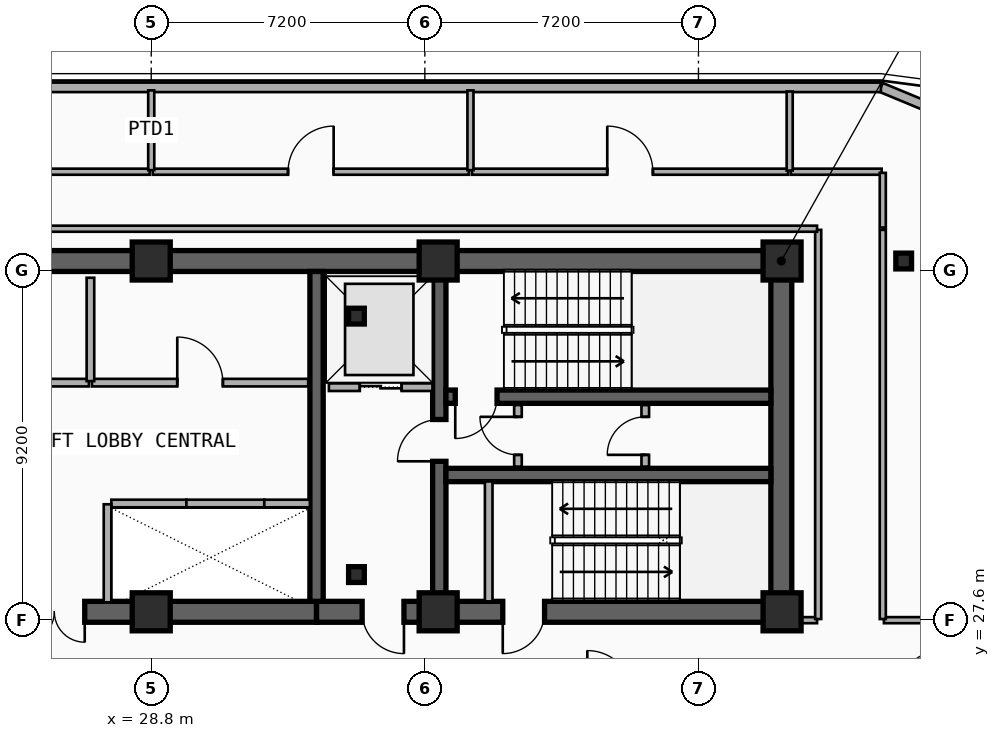
"""IFC4 building model, lengths in metres.
Left out: names, types, materials, properties, quantities, classifications, styles, units other than length and angle.
Written with IfcOpenShell. Run it as: python <this file> out.ifc"""

import sys

from ifc_helpers import new_model, si_unit, direction, frame, frame_2d, origin, origin_2d, place, context, subcontext, project, spatial, rectangle, i_section, extrude, element, fill, save


model = new_model("IFC4")
c1 = context("Model", 3, precision=1e-05, world=origin(), true_north=direction((0.0, 1.0)))
c2 = subcontext(c1, "Body", "Model", "MODEL_VIEW")
j1 = project(units=[si_unit("LENGTHUNIT", "METRE"), si_unit("PLANEANGLEUNIT", "RADIAN")], contexts=[c1])
p1 = place(None, origin())
s1 = spatial("IfcSite", under=j1, at=p1, CompositionType="ELEMENT")
p2 = place(p1, origin())
s2 = spatial("IfcBuilding", under=s1, at=p2, CompositionType="ELEMENT")
p3 = place(p2, frame((0.0, 0.0, 188.4)))
s3 = spatial("IfcBuildingStorey", under=s2, at=p3, CompositionType="ELEMENT", Elevation=188.4)
p4 = place(p3, frame((12.15, 37.05, 0.0), z_axis=(0.0, 0.0, 1.0), x_axis=(1.0, 0.0, 0.0)))
e1 = element("IfcWall", 1, at=p4, inside=s3, PredefinedType="SHEAR", context=c2, shape_type="SweptSolid", body=[
    extrude(rectangle(XDim=33.23, YDim=0.55, at=frame_2d((16.615, 0.0))), origin(), (0.0, 0.0, 1.0), 4.8),
])
p5 = place(p3, frame((33.15, 27.82, 0.0), z_axis=(0.0, 0.0, 1.0), x_axis=(-1.0, 0.0, 0.0)))
e2 = element("IfcWall", 2, at=p5, inside=s3, PredefinedType="SHEAR", context=c2, shape_type="SweptSolid", body=[
    extrude(rectangle(XDim=11.97, YDim=0.55, at=frame_2d((5.985, 0.0))), origin(), (0.0, 0.0, 1.0), 4.8),
])
p6 = place(p5, frame((6.1, 0.0, 0.0)))
e3 = element("IfcOpeningElement", 3, at=p6, cuts=e2, PredefinedType="OPENING", context=c2, shape_type="SweptSolid", body=[
    extrude(rectangle(XDim=1.6, YDim=2.2, at=frame_2d((0.8, 1.1))), frame((0.0, 0.285, 0.0), z_axis=(0.0, -1.0, 0.0), x_axis=(1.0, 0.0, 0.0)), (0.0, 0.0, 1.0), 0.57),
])
p7 = place(p3, frame((45.38, 27.82, 0.0), z_axis=(0.0, 0.0, 1.0), x_axis=(-1.0, 0.0, 0.0)))
e4 = element("IfcWall", 4, at=p7, inside=s3, PredefinedType="SHEAR", context=c2, shape_type="SweptSolid", body=[
    extrude(rectangle(XDim=12.23, YDim=0.55, at=frame_2d((6.115, 0.0))), origin(), (0.0, 0.0, 1.0), 4.8),
])
p8 = place(p7, frame((9.93, 0.0, 0.0)))
e5 = element("IfcOpeningElement", 5, at=p8, cuts=e4, PredefinedType="OPENING", context=c2, shape_type="SweptSolid", body=[
    extrude(rectangle(XDim=1.1, YDim=2.15, at=frame_2d((0.55, 1.075))), frame((0.0, 0.285, 0.0), z_axis=(0.0, -1.0, 0.0), x_axis=(1.0, 0.0, 0.0)), (0.0, 0.0, 1.0), 0.57),
])
p9 = place(p7, frame((6.23, 0.0, 0.0)))
e6 = element("IfcOpeningElement", 6, at=p9, cuts=e4, PredefinedType="OPENING", context=c2, shape_type="SweptSolid", body=[
    extrude(rectangle(XDim=1.1, YDim=2.15, at=frame_2d((0.55, 1.075))), frame((0.0, 0.285, 0.0), z_axis=(0.0, -1.0, 0.0), x_axis=(1.0, 0.0, 0.0)), (0.0, 0.0, 1.0), 0.57),
])
p10 = place(p3, frame((45.38, 28.095, 0.0), z_axis=(0.0, 0.0, 1.0), x_axis=(0.0, 1.0, 0.0)))
e7 = element("IfcWall", 7, at=p10, inside=s3, PredefinedType="SHEAR", context=c2, shape_type="SweptSolid", body=[
    extrude(rectangle(XDim=8.68, YDim=0.55, at=frame_2d((4.34, 0.0))), origin(), (0.0, 0.0, 1.0), 4.8),
])
p11 = place(p3, frame((33.15, 28.095, 0.0), z_axis=(0.0, 0.0, 1.0), x_axis=(0.0, 1.0, 0.0)))
e8 = element("IfcWall", 8, at=p11, inside=s3, PredefinedType="SHEAR", context=c2, shape_type="SweptSolid", body=[
    extrude(rectangle(XDim=8.68, YDim=0.35, at=frame_2d((4.34, 0.0))), origin(), (0.0, 0.0, 1.0), 4.8),
])
p12 = place(p3, frame((36.38, 28.095, 0.0), z_axis=(0.0, 0.0, 1.0), x_axis=(0.0, 1.0, 0.0)))
e9 = element("IfcWall", 9, at=p12, inside=s3, PredefinedType="SHEAR", context=c2, shape_type="SweptSolid", body=[
    extrude(rectangle(XDim=8.68, YDim=0.35, at=frame_2d((4.34, 0.0))), origin(), (0.0, 0.0, 1.0), 4.8),
])
p13 = place(p12, frame((3.685, 0.0, 0.0)))
e10 = element("IfcOpeningElement", 10, at=p13, cuts=e9, PredefinedType="OPENING", context=c2, shape_type="SweptSolid", body=[
    extrude(rectangle(XDim=1.1, YDim=2.15, at=frame_2d((0.55, 1.075))), frame((0.0, 0.185, 0.0), z_axis=(0.0, -1.0, 0.0), x_axis=(1.0, 0.0, 0.0)), (0.0, 0.0, 1.0), 0.37),
])
p14 = place(p3, frame((45.105, 33.48, 0.0), z_axis=(0.0, 0.0, 1.0), x_axis=(-1.0, 0.0, 0.0)))
e11 = element("IfcWall", 11, at=p14, inside=s3, PredefinedType="SHEAR", context=c2, shape_type="SweptSolid", body=[
    extrude(rectangle(XDim=8.55, YDim=0.35, at=frame_2d((4.275, 0.0))), origin(), (0.0, 0.0, 1.0), 4.8),
])
p15 = place(p14, frame((7.205, 0.0, 0.0)))
e12 = element("IfcOpeningElement", 12, at=p15, cuts=e11, PredefinedType="OPENING", context=c2, shape_type="SweptSolid", body=[
    extrude(rectangle(XDim=1.1, YDim=2.15, at=frame_2d((0.55, 1.075))), frame((0.0, 0.185, 0.0), z_axis=(0.0, -1.0, 0.0), x_axis=(1.0, 0.0, 0.0)), (0.0, 0.0, 1.0), 0.37),
])
p16 = place(p3, frame((36.555, 31.42, 0.0), z_axis=(0.0, 0.0, 1.0), x_axis=(1.0, 0.0, 0.0)))
e13 = element("IfcWall", 13, at=p16, inside=s3, PredefinedType="SHEAR", context=c2, shape_type="SweptSolid", body=[
    extrude(rectangle(XDim=8.55, YDim=0.35, at=frame_2d((4.275, 0.0))), origin(), (0.0, 0.0, 1.0), 4.8),
])
for number, where, z_axis, x_axis in (
    (14, (34.2, 28.8, 0.0), (0.0, 0.0, 1.0), (1.0, 0.0, 0.0)),
    (15, (34.2, 35.6, 0.0), (0.0, 0.0, 1.0), (1.0, 0.0, 0.0)),
):
    element("IfcColumn", number, at=place(p3, frame(where, z_axis=z_axis, x_axis=x_axis)), inside=s3, PredefinedType="COLUMN", context=c2, shape_type="SweptSolid", body=[
        extrude(i_section(OverallWidth=0.413, OverallDepth=0.415, WebThickness=0.03, FlangeThickness=0.047, FilletRadius=0.015, at=origin_2d()), origin(), (0.0, 0.0, 1.0), 4.8),
    ])
for number, where, z_axis, x_axis in (
    (16, (28.8, 27.82, 0.0), (0.0, 0.0, 1.0), (1.0, 0.0, 0.0)),
    (17, (28.8, 37.05, 0.0), (0.0, 0.0, 1.0), (1.0, 0.0, 0.0)),
    (18, (36.35, 27.82, 0.0), (0.0, 0.0, 1.0), (1.0, 0.0, 0.0)),
    (19, (36.35, 37.05, 0.0), (0.0, 0.0, 1.0), (1.0, 0.0, 0.0)),
    (20, (45.4, 27.82, 0.0), (0.0, 0.0, 1.0), (1.0, 0.0, 0.0)),
    (21, (45.4, 37.05, 0.0), (0.0, 0.0, 1.0), (1.0, 0.0, 0.0)),
):
    element("IfcColumn", number, at=place(p3, frame(where, z_axis=z_axis, x_axis=x_axis)), inside=s3, PredefinedType="COLUMN", context=c2, shape_type="SweptSolid", body=[
        extrude(rectangle(XDim=1.0, YDim=1.0, at=origin_2d()), origin(), (0.0, 0.0, 1.0), 4.8),
    ])
p17 = place(p3, frame((48.6, 37.05, 0.0), z_axis=(0.0, 0.0, 1.0), x_axis=(1.0, 0.0, 0.0)))
e22 = element("IfcColumn", 22, at=p17, inside=s3, PredefinedType="COLUMN", context=c2, shape_type="SweptSolid", body=[
    extrude(i_section(OverallWidth=0.413, OverallDepth=0.415, WebThickness=0.03, FlangeThickness=0.047, FilletRadius=0.015, at=origin_2d()), origin(), (0.0, 0.0, 1.0), 4.8),
])
p18 = place(p3, frame((48.0, 41.62, 0.0), z_axis=(0.0, 0.0, 1.0), x_axis=(0.923870793506, -0.382704529509, 0.0)))
e23 = element("IfcWall", 23, at=p18, inside=s3, PredefinedType="SOLIDWALL", context=c2, shape_type="SweptSolid", body=[
    extrude(rectangle(XDim=3.077, YDim=0.25, at=frame_2d((1.538, 0.0))), origin(), (0.0, 0.0, 1.0), 4.48),
])
p19 = place(p3, frame((9.6, 41.62, 0.0), z_axis=(0.0, 0.0, 1.0), x_axis=(1.0, 0.0, 0.0)))
e24 = element("IfcWall", 24, at=p19, inside=s3, PredefinedType="SOLIDWALL", context=c2, shape_type="SweptSolid", body=[
    extrude(rectangle(XDim=38.4, YDim=0.25, at=frame_2d((19.2, 0.0))), origin(), (0.0, 0.0, 1.0), 4.48),
])
p20 = place(p3, frame((33.475, 33.73, 0.0), z_axis=(0.0, 0.0, 1.0), x_axis=(1.0, 0.0, 0.0)))
e25 = element("IfcWall", 25, at=p20, inside=s3, PredefinedType="PARTITIONING", context=c2, shape_type="SweptSolid", body=[
    extrude(rectangle(XDim=2.725, YDim=0.2, at=frame_2d((1.362, 0.0))), origin(), (0.0, 0.0, 1.0), 3.55),
])
p21 = place(p20, frame((0.812, 0.0, 0.0)))
e26 = element("IfcOpeningElement", 26, at=p21, cuts=e25, PredefinedType="OPENING", context=c2, shape_type="SweptSolid", body=[
    extrude(rectangle(XDim=1.1, YDim=2.15, at=frame_2d((0.55, 1.075))), frame((0.0, 0.11, 0.0), z_axis=(0.0, -1.0, 0.0), x_axis=(1.0, 0.0, 0.0)), (0.0, 0.0, 1.0), 0.22),
])
p22 = place(p3, frame((27.75, 30.67, 0.0), z_axis=(0.0, 0.0, 1.0), x_axis=(1.0, 0.0, 0.0)))
e27 = element("IfcWall", 27, at=p22, inside=s3, PredefinedType="PARTITIONING", context=c2, shape_type="SweptSolid", body=[
    extrude(rectangle(XDim=1.975, YDim=0.2, at=frame_2d((0.988, 0.0))), origin(), (0.0, 0.0, 1.0), 3.55),
])
p23 = place(p3, frame((27.65, 28.07, 0.0), z_axis=(0.0, 0.0, 1.0), x_axis=(0.0, 1.0, 0.0)))
e28 = element("IfcWall", 28, at=p23, inside=s3, PredefinedType="PARTITIONING", context=c2, shape_type="SweptSolid", body=[
    extrude(rectangle(XDim=2.58, YDim=0.2, at=frame_2d((1.29, 0.0))), origin(), (0.0, 0.0, 1.0), 3.55),
])
p24 = place(p3, frame((29.725, 30.67, 0.0), z_axis=(0.0, 0.0, 1.0), x_axis=(1.0, 0.0, 0.0)))
e29 = element("IfcWall", 29, at=p24, inside=s3, PredefinedType="PARTITIONING", context=c2, shape_type="SweptSolid", body=[
    extrude(rectangle(XDim=2.05, YDim=0.2, at=frame_2d((1.025, 0.0))), origin(), (0.0, 0.0, 1.0), 3.86),
])
p25 = place(p3, frame((31.775, 30.67, 0.0), z_axis=(0.0, 0.0, 1.0), x_axis=(1.0, 0.0, 0.0)))
e30 = element("IfcWall", 30, at=p25, inside=s3, PredefinedType="PARTITIONING", context=c2, shape_type="SweptSolid", body=[
    extrude(rectangle(XDim=1.2, YDim=0.2, at=frame_2d((0.6, 0.0))), origin(), (0.0, 0.0, 1.0), 3.86),
])
p26 = place(p3, frame((37.68, 28.095, 0.0), z_axis=(0.0, 0.0, 1.0), x_axis=(0.0, 1.0, 0.0)))
e31 = element("IfcWall", 31, at=p26, inside=s3, PredefinedType="PARTITIONING", context=c2, shape_type="SweptSolid", body=[
    extrude(rectangle(XDim=3.155, YDim=0.2, at=frame_2d((1.578, 0.0))), origin(), (0.0, 0.0, 1.0), 3.86),
])
p27 = place(p3, frame((38.45, 31.64, 0.0), z_axis=(0.0, 0.0, 1.0), x_axis=(0.0, 1.0, 0.0)))
e32 = element("IfcWall", 32, at=p27, inside=s3, PredefinedType="PARTITIONING", context=c2, shape_type="SweptSolid", body=[
    extrude(rectangle(XDim=1.62, YDim=0.2, at=frame_2d((0.81, 0.0))), origin(), (0.0, 0.0, 1.0), 4.48),
])
p28 = place(p27, frame((0.31, 0.0, 0.0)))
e33 = element("IfcOpeningElement", 33, at=p28, cuts=e32, PredefinedType="OPENING", context=c2, shape_type="SweptSolid", body=[
    extrude(rectangle(XDim=1.0, YDim=2.15, at=frame_2d((0.5, 1.075))), frame((0.0, 0.11, 0.0), z_axis=(0.0, -1.0, 0.0), x_axis=(1.0, 0.0, 0.0)), (0.0, 0.0, 1.0), 0.22),
])
p29 = place(p3, frame((41.8, 31.64, 0.0), z_axis=(0.0, 0.0, 1.0), x_axis=(0.0, 1.0, 0.0)))
e34 = element("IfcWall", 34, at=p29, inside=s3, PredefinedType="PARTITIONING", context=c2, shape_type="SweptSolid", body=[
    extrude(rectangle(XDim=1.62, YDim=0.2, at=frame_2d((0.81, 0.0))), origin(), (0.0, 0.0, 1.0), 4.48),
])
p30 = place(p29, frame((0.31, 0.0, 0.0)))
e35 = element("IfcOpeningElement", 35, at=p30, cuts=e34, PredefinedType="OPENING", context=c2, shape_type="SweptSolid", body=[
    extrude(rectangle(XDim=1.0, YDim=2.15, at=frame_2d((0.5, 1.075))), frame((0.0, 0.11, 0.0), z_axis=(0.0, -1.0, 0.0), x_axis=(1.0, 0.0, 0.0)), (0.0, 0.0, 1.0), 0.22),
])
p31 = place(p3, frame((23.64, 33.85, 0.0), z_axis=(0.0, 0.0, 1.0), x_axis=(1.0, 0.0, 0.0)))
e36 = element("IfcWall", 36, at=p31, inside=s3, PredefinedType="PARTITIONING", context=c2, shape_type="SweptSolid", body=[
    extrude(rectangle(XDim=3.52, YDim=0.2, at=frame_2d((1.76, 0.0))), origin(), (0.0, 0.0, 1.0), 4.48),
])
p32 = place(p31, frame((1.16, 0.0, 0.0)))
e37 = element("IfcOpeningElement", 37, at=p32, cuts=e36, PredefinedType="OPENING", context=c2, shape_type="SweptSolid", body=[
    extrude(rectangle(XDim=1.2, YDim=2.15, at=frame_2d((0.6, 1.075))), frame((0.0, 0.11, 0.0), z_axis=(0.0, -1.0, 0.0), x_axis=(1.0, 0.0, 0.0)), (0.0, 0.0, 1.0), 0.22),
])
p33 = place(p3, frame((27.24, 33.85, 0.0), z_axis=(0.0, 0.0, 1.0), x_axis=(1.0, 0.0, 0.0)))
e38 = element("IfcWall", 38, at=p33, inside=s3, PredefinedType="PARTITIONING", context=c2, shape_type="SweptSolid", body=[
    extrude(rectangle(XDim=5.69, YDim=0.2, at=frame_2d((2.845, 0.0))), origin(), (0.0, 0.0, 1.0), 3.55),
])
p34 = place(p33, frame((2.245, 0.0, 0.0)))
e39 = element("IfcOpeningElement", 39, at=p34, cuts=e38, PredefinedType="OPENING", context=c2, shape_type="SweptSolid", body=[
    extrude(rectangle(XDim=1.2, YDim=2.15, at=frame_2d((0.6, 1.075))), frame((0.0, 0.11, 0.0), z_axis=(0.0, -1.0, 0.0), x_axis=(1.0, 0.0, 0.0)), (0.0, 0.0, 1.0), 0.22),
])
p35 = place(p3, frame((27.2, 33.89, 0.0), z_axis=(0.0, 0.0, 1.0), x_axis=(0.0, 1.0, 0.0)))
e40 = element("IfcWall", 40, at=p35, inside=s3, PredefinedType="PARTITIONING", context=c2, shape_type="SweptSolid", body=[
    extrude(rectangle(XDim=2.72, YDim=0.2, at=frame_2d((1.36, 0.0))), origin(), (0.0, 0.0, 1.0), 4.48),
])
p36 = place(p3, frame((12.04, 39.4, 0.0), z_axis=(0.0, 0.0, 1.0), x_axis=(1.0, 0.0, 0.0)))
e41 = element("IfcWall", 41, at=p36, inside=s3, PredefinedType="PARTITIONING", context=c2, shape_type="SweptSolid", body=[
    extrude(rectangle(XDim=16.72, YDim=0.16, at=frame_2d((8.36, 0.0))), origin(), (0.0, 0.0, 1.0), 4.48),
])
p37 = place(p36, frame((7.76, 0.0, 0.0)))
e42 = element("IfcOpeningElement", 42, at=p37, cuts=e41, PredefinedType="OPENING", context=c2, shape_type="SweptSolid", body=[
    extrude(rectangle(XDim=1.2, YDim=2.15, at=frame_2d((0.6, 1.075))), frame((0.0, 0.09, 0.0), z_axis=(0.0, -1.0, 0.0), x_axis=(1.0, 0.0, 0.0)), (0.0, 0.0, 1.0), 0.18),
])
p38 = place(p3, frame((28.84, 39.4, 0.0), z_axis=(0.0, 0.0, 1.0), x_axis=(1.0, 0.0, 0.0)))
e43 = element("IfcWall", 43, at=p38, inside=s3, PredefinedType="PARTITIONING", context=c2, shape_type="SweptSolid", body=[
    extrude(rectangle(XDim=8.32, YDim=0.16, at=frame_2d((4.16, 0.0))), origin(), (0.0, 0.0, 1.0), 4.48),
])
p39 = place(p38, frame((3.56, 0.0, 0.0)))
e44 = element("IfcOpeningElement", 44, at=p39, cuts=e43, PredefinedType="OPENING", context=c2, shape_type="SweptSolid", body=[
    extrude(rectangle(XDim=1.2, YDim=2.15, at=frame_2d((0.6, 1.075))), frame((0.0, 0.09, 0.0), z_axis=(0.0, -1.0, 0.0), x_axis=(1.0, 0.0, 0.0)), (0.0, 0.0, 1.0), 0.18),
])
p40 = place(p3, frame((37.24, 39.4, 0.0), z_axis=(0.0, 0.0, 1.0), x_axis=(1.0, 0.0, 0.0)))
e45 = element("IfcWall", 45, at=p40, inside=s3, PredefinedType="PARTITIONING", context=c2, shape_type="SweptSolid", body=[
    extrude(rectangle(XDim=8.32, YDim=0.16, at=frame_2d((4.16, 0.0))), origin(), (0.0, 0.0, 1.0), 4.48),
])
p41 = place(p40, frame((3.56, 0.0, 0.0)))
e46 = element("IfcOpeningElement", 46, at=p41, cuts=e45, PredefinedType="OPENING", context=c2, shape_type="SweptSolid", body=[
    extrude(rectangle(XDim=1.2, YDim=2.15, at=frame_2d((0.6, 1.075))), frame((0.0, 0.09, 0.0), z_axis=(0.0, -1.0, 0.0), x_axis=(1.0, 0.0, 0.0)), (0.0, 0.0, 1.0), 0.18),
])
for number, where, z_axis, x_axis in (
    (47, (28.8, 39.44, 0.0), (0.0, 0.0, 1.0), (0.0, 1.0, 0.0)),
    (48, (37.2, 39.44, 0.0), (0.0, 0.0, 1.0), (0.0, 1.0, 0.0)),
):
    element("IfcWall", number, at=place(p3, frame(where, z_axis=z_axis, x_axis=x_axis)), inside=s3, PredefinedType="PARTITIONING", context=c2, shape_type="SweptSolid", body=[
        extrude(rectangle(XDim=2.1, YDim=0.16, at=frame_2d((1.05, 0.0))), origin(), (0.0, 0.0, 1.0), 4.48),
    ])
p42 = place(p3, frame((45.41, 27.6, 0.0), z_axis=(0.0, 0.0, 1.0), x_axis=(1.0, 0.0, 0.0)))
e49 = element("IfcWall", 49, at=p42, inside=s3, PredefinedType="PARTITIONING", context=c2, shape_type="SweptSolid", body=[
    extrude(rectangle(XDim=0.91, YDim=0.16, at=frame_2d((0.455, 0.0))), origin(), (0.0, 0.0, 1.0), 3.55),
])
p43 = place(p3, frame((48.08, 27.6, 0.0), z_axis=(0.0, 0.0, 1.0), x_axis=(1.0, 0.0, 0.0)))
e50 = element("IfcWall", 50, at=p43, inside=s3, PredefinedType="PARTITIONING", context=c2, shape_type="SweptSolid", body=[
    extrude(rectangle(XDim=3.83, YDim=0.16, at=frame_2d((1.915, 0.0))), origin(), (0.0, 0.0, 1.0), 3.81),
])
for number, where, z_axis, x_axis in (
    (51, (46.35, 27.63, 0.0), (0.0, 0.0, 1.0), (0.0, 1.0, 0.0)),
    (52, (48.05, 27.63, 0.0), (0.0, 0.0, 1.0), (0.0, 1.0, 0.0)),
):
    element("IfcWall", number, at=place(p3, frame(where, z_axis=z_axis, x_axis=x_axis)), inside=s3, PredefinedType="PARTITIONING", context=c2, shape_type="SweptSolid", body=[
        extrude(rectangle(XDim=10.24, YDim=0.16, at=frame_2d((5.12, 0.0))), origin(), (0.0, 0.0, 1.0), 3.96),
    ])
p44 = place(p3, frame((9.58, 37.9, 0.0), z_axis=(0.0, 0.0, 1.0), x_axis=(1.0, 0.0, 0.0)))
e53 = element("IfcWall", 53, at=p44, inside=s3, PredefinedType="PARTITIONING", context=c2, shape_type="SweptSolid", body=[
    extrude(rectangle(XDim=36.74, YDim=0.16, at=frame_2d((18.37, 0.0))), origin(), (0.0, 0.0, 1.0), 4.48),
])
p45 = place(p3, frame((45.63, 39.4, 0.0), z_axis=(0.0, 0.0, 1.0), x_axis=(1.0, 0.0, 0.0)))
e54 = element("IfcWall", 54, at=p45, inside=s3, PredefinedType="PARTITIONING", context=c2, shape_type="SweptSolid", body=[
    extrude(rectangle(XDim=2.39, YDim=0.16, at=frame_2d((1.195, 0.0))), origin(), (0.0, 0.0, 1.0), 4.48),
])
p46 = place(p3, frame((48.05, 37.93, 0.0), z_axis=(0.0, 0.0, 1.0), x_axis=(0.0, 1.0, 0.0)))
e55 = element("IfcWall", 55, at=p46, inside=s3, PredefinedType="PARTITIONING", context=c2, shape_type="SweptSolid", body=[
    extrude(rectangle(XDim=1.44, YDim=0.16, at=frame_2d((0.72, 0.0))), origin(), (0.0, 0.0, 1.0), 4.48),
])
p47 = place(p3, frame((45.6, 39.43, 0.0), z_axis=(0.0, 0.0, 1.0), x_axis=(0.0, 1.0, 0.0)))
e56 = element("IfcWall", 56, at=p47, inside=s3, PredefinedType="PARTITIONING", context=c2, shape_type="SweptSolid", body=[
    extrude(rectangle(XDim=2.08, YDim=0.16, at=frame_2d((1.04, 0.0))), origin(), (0.0, 0.0, 1.0), 4.48),
])
p48 = place(p21, origin())
e57 = element("IfcDoor", 57, at=p48, inside=s3, OperationType="DOUBLE_DOOR_SLIDING", PredefinedType="DOOR", context=c2, shape_type="SweptSolid", body=[
    extrude(rectangle(XDim=1.1, YDim=2.15, at=frame_2d((0.55, 1.075))), frame((0.0, 0.025, 0.0), z_axis=(0.0, -1.0, 0.0), x_axis=(1.0, 0.0, 0.0)), (0.0, 0.0, 1.0), 0.05),
])
fill(e26, e57)
p49 = place(p15, origin())
e58 = element("IfcDoor", 58, at=p49, inside=s3, OperationType="SINGLE_SWING_RIGHT", PredefinedType="DOOR", context=c2, shape_type="SweptSolid", body=[
    extrude(rectangle(XDim=1.1, YDim=2.15, at=frame_2d((0.55, 1.075))), frame((0.0, 0.025, 0.0), z_axis=(0.0, -1.0, 0.0), x_axis=(1.0, 0.0, 0.0)), (0.0, 0.0, 1.0), 0.05),
])
fill(e12, e58)
p50 = place(p13, origin())
e59 = element("IfcDoor", 59, at=p50, inside=s3, OperationType="SINGLE_SWING_LEFT", PredefinedType="DOOR", context=c2, shape_type="SweptSolid", body=[
    extrude(rectangle(XDim=1.1, YDim=2.15, at=frame_2d((0.55, 1.075))), frame((0.0, 0.025, 0.0), z_axis=(0.0, -1.0, 0.0), x_axis=(1.0, 0.0, 0.0)), (0.0, 0.0, 1.0), 0.05),
])
fill(e10, e59)
p51 = place(p8, origin())
e60 = element("IfcDoor", 60, at=p51, inside=s3, OperationType="SINGLE_SWING_LEFT", PredefinedType="DOOR", context=c2, shape_type="SweptSolid", body=[
    extrude(rectangle(XDim=1.1, YDim=2.15, at=frame_2d((0.55, 1.075))), frame((0.0, 0.025, 0.0), z_axis=(0.0, -1.0, 0.0), x_axis=(1.0, 0.0, 0.0)), (0.0, 0.0, 1.0), 0.05),
])
fill(e5, e60)
p52 = place(p9, origin())
e61 = element("IfcDoor", 61, at=p52, inside=s3, OperationType="SINGLE_SWING_RIGHT", PredefinedType="DOOR", context=c2, shape_type="SweptSolid", body=[
    extrude(rectangle(XDim=1.1, YDim=2.15, at=frame_2d((0.55, 1.075))), frame((0.0, 0.025, 0.0), z_axis=(0.0, -1.0, 0.0), x_axis=(1.0, 0.0, 0.0)), (0.0, 0.0, 1.0), 0.05),
])
fill(e6, e61)
p53 = place(p6, origin())
e62 = element("IfcDoor", 62, at=p53, inside=s3, OperationType="SINGLE_SWING_LEFT", PredefinedType="DOOR", context=c2, shape_type="SweptSolid", body=[
    extrude(rectangle(XDim=1.6, YDim=2.2, at=frame_2d((0.8, 1.1))), frame((0.0, 0.025, 0.0), z_axis=(0.0, -1.0, 0.0), x_axis=(1.0, 0.0, 0.0)), (0.0, 0.0, 1.0), 0.05),
])
fill(e3, e62)
p54 = place(p28, origin())
e63 = element("IfcDoor", 63, at=p54, inside=s3, OperationType="SINGLE_SWING_RIGHT", PredefinedType="DOOR", context=c2, shape_type="SweptSolid", body=[
    extrude(rectangle(XDim=1.0, YDim=2.15, at=frame_2d((0.5, 1.075))), frame((0.0, 0.025, 0.0), z_axis=(0.0, -1.0, 0.0), x_axis=(1.0, 0.0, 0.0)), (0.0, 0.0, 1.0), 0.05),
])
fill(e33, e63)
p55 = place(p30, origin())
e64 = element("IfcDoor", 64, at=p55, inside=s3, OperationType="SINGLE_SWING_LEFT", PredefinedType="DOOR", context=c2, shape_type="SweptSolid", body=[
    extrude(rectangle(XDim=1.0, YDim=2.15, at=frame_2d((0.5, 1.075))), frame((0.0, 0.025, 0.0), z_axis=(0.0, -1.0, 0.0), x_axis=(1.0, 0.0, 0.0)), (0.0, 0.0, 1.0), 0.05),
])
fill(e35, e64)
p56 = place(p34, origin())
e65 = element("IfcDoor", 65, at=p56, inside=s3, OperationType="SINGLE_SWING_LEFT", PredefinedType="DOOR", context=c2, shape_type="SweptSolid", body=[
    extrude(rectangle(XDim=1.2, YDim=2.15, at=frame_2d((0.6, 1.075))), frame((0.0, 0.025, 0.0), z_axis=(0.0, -1.0, 0.0), x_axis=(1.0, 0.0, 0.0)), (0.0, 0.0, 1.0), 0.05),
])
fill(e39, e65)
p57 = place(p39, origin())
e66 = element("IfcDoor", 66, at=p57, inside=s3, OperationType="SINGLE_SWING_RIGHT", PredefinedType="DOOR", context=c2, shape_type="SweptSolid", body=[
    extrude(rectangle(XDim=1.2, YDim=2.15, at=frame_2d((0.6, 1.075))), frame((0.0, 0.025, 0.0), z_axis=(0.0, -1.0, 0.0), x_axis=(1.0, 0.0, 0.0)), (0.0, 0.0, 1.0), 0.05),
])
fill(e44, e66)
p58 = place(p41, origin())
e67 = element("IfcDoor", 67, at=p58, inside=s3, OperationType="SINGLE_SWING_LEFT", PredefinedType="DOOR", context=c2, shape_type="SweptSolid", body=[
    extrude(rectangle(XDim=1.2, YDim=2.15, at=frame_2d((0.6, 1.075))), frame((0.0, 0.025, 0.0), z_axis=(0.0, -1.0, 0.0), x_axis=(1.0, 0.0, 0.0)), (0.0, 0.0, 1.0), 0.05),
])
fill(e46, e67)
save(model, sys.argv[1])
